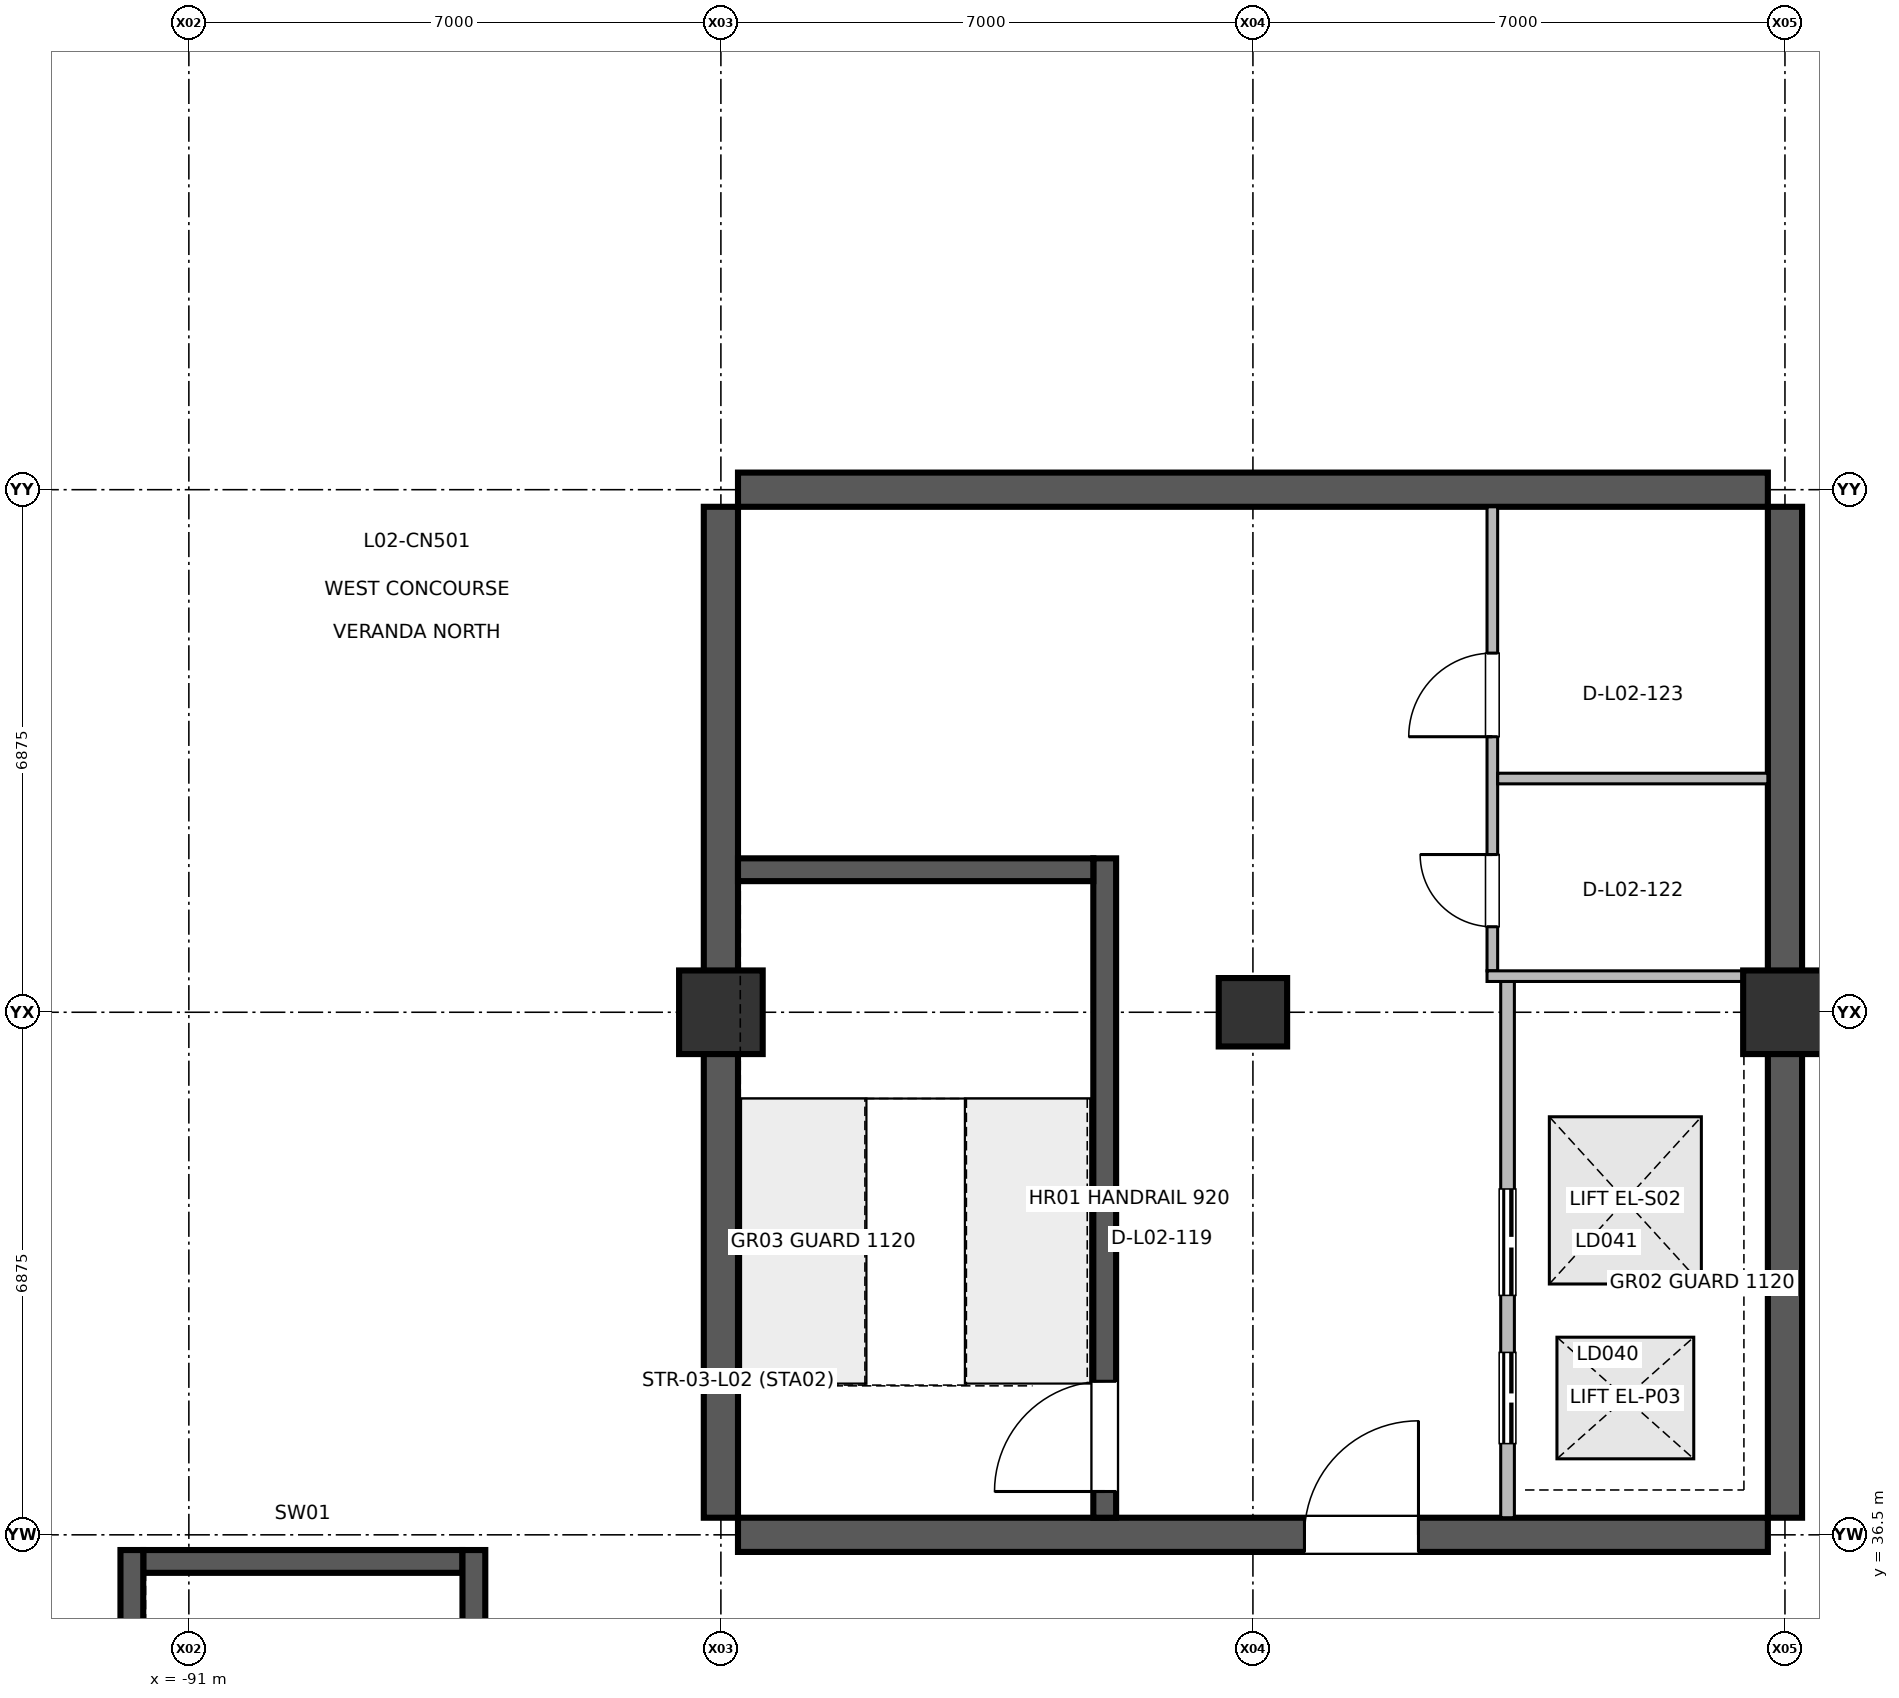
"""IFC4 building model, lengths in metres.
Left out: names, types, materials, properties, quantities, classifications, styles, units other than length and angle.
Written with IfcOpenShell. Run it as: python <this file> out.ifc"""

import sys

from ifc_helpers import new_model, si_unit, direction, frame, frame_2d, origin, origin_2d, place, context, subcontext, project, spatial, rectangle, extrude, element, fill, save


model = new_model("IFC4")
c1 = context("Model", 3, precision=1e-05, world=origin(), true_north=direction((0.0, 1.0)))
c2 = subcontext(c1, "Body", "Model", "MODEL_VIEW")
j1 = project(units=[si_unit("LENGTHUNIT", "METRE"), si_unit("PLANEANGLEUNIT", "RADIAN")], contexts=[c1])
p1 = place(None, origin())
s1 = spatial("IfcSite", under=j1, at=p1, CompositionType="ELEMENT")
p2 = place(p1, origin())
s2 = spatial("IfcBuilding", under=s1, at=p2, CompositionType="ELEMENT")
p3 = place(p2, frame((0.0, 0.0, 6.0)))
s3 = spatial("IfcBuildingStorey", under=s2, at=p3, CompositionType="ELEMENT", Elevation=6.0)
p4 = place(p3, frame((-84.0, 43.375, 0.0), z_axis=(0.0, 0.0, 1.0), x_axis=(1.0, 0.0, 0.0)))
e1 = element("IfcColumn", 1, at=p4, inside=s3, PredefinedType="COLUMN", context=c2, shape_type="SweptSolid", body=[
    extrude(rectangle(XDim=1.1, YDim=1.1, at=origin_2d()), origin(), (0.0, 0.0, 1.0), 5.398),
])
p5 = place(p3, frame((-77.0, 43.375, 0.0), z_axis=(0.0, 0.0, 1.0), x_axis=(1.0, 0.0, 0.0)))
e2 = element("IfcColumn", 2, at=p5, inside=s3, PredefinedType="COLUMN", context=c2, shape_type="SweptSolid", body=[
    extrude(rectangle(XDim=0.9, YDim=0.9, at=origin_2d()), origin(), (0.0, 0.0, 1.0), 5.398),
])
p6 = place(p3, frame((-70.0, 43.375, 0.0), z_axis=(0.0, 0.0, 1.0), x_axis=(1.0, 0.0, 0.0)))
e3 = element("IfcColumn", 3, at=p6, inside=s3, PredefinedType="COLUMN", context=c2, shape_type="SweptSolid", body=[
    extrude(rectangle(XDim=1.1, YDim=1.1, at=origin_2d()), origin(), (0.0, 0.0, 1.0), 5.398),
])
for number, where, z_axis, x_axis in (
    (4, (-84.0, 36.725, 0.0), (0.0, 0.0, 1.0), (0.0, 1.0, 0.0)),
    (5, (-70.0, 36.725, 0.0), (0.0, 0.0, 1.0), (0.0, 1.0, 0.0)),
):
    element("IfcWall", number, at=place(p3, frame(where, z_axis=z_axis, x_axis=x_axis)), inside=s3, PredefinedType="SHEAR", context=c2, shape_type="SweptSolid", body=[
        extrude(rectangle(XDim=13.3, YDim=0.45, at=frame_2d((6.65, 0.0))), origin(), (0.0, 0.0, 1.0), 5.2),
    ])
p7 = place(p3, frame((-83.775, 36.5, 0.0), z_axis=(0.0, 0.0, 1.0), x_axis=(1.0, 0.0, 0.0)))
e6 = element("IfcWall", 6, at=p7, inside=s3, PredefinedType="SHEAR", context=c2, shape_type="SweptSolid", body=[
    extrude(rectangle(XDim=13.55, YDim=0.45, at=frame_2d((6.775, 0.0))), origin(), (0.0, 0.0, 1.0), 5.2),
])
p8 = place(p7, frame((7.453, 0.0, 0.0)))
e7 = element("IfcOpeningElement", 7, at=p8, cuts=e6, PredefinedType="OPENING", context=c2, shape_type="SweptSolid", body=[
    extrude(rectangle(XDim=1.5, YDim=2.2, at=frame_2d((0.75, 1.1))), frame((0.0, 0.235, 0.0), z_axis=(0.0, -1.0, 0.0), x_axis=(1.0, 0.0, 0.0)), (0.0, 0.0, 1.0), 0.47),
])
p9 = place(p3, frame((-83.775, 50.25, 0.0), z_axis=(0.0, 0.0, 1.0), x_axis=(1.0, 0.0, 0.0)))
e8 = element("IfcWall", 8, at=p9, inside=s3, PredefinedType="SHEAR", context=c2, shape_type="SweptSolid", body=[
    extrude(rectangle(XDim=13.55, YDim=0.45, at=frame_2d((6.775, 0.0))), origin(), (0.0, 0.0, 1.0), 5.2),
])
p10 = place(p3, frame((-78.95, 36.725, 0.0), z_axis=(0.0, 0.0, 1.0), x_axis=(0.0, 1.0, 0.0)))
e9 = element("IfcWall", 9, at=p10, inside=s3, PredefinedType="SHEAR", context=c2, shape_type="SweptSolid", body=[
    extrude(rectangle(XDim=8.675, YDim=0.3, at=frame_2d((4.337, 0.0))), origin(), (0.0, 0.0, 1.0), 5.2),
])
p11 = place(p10, frame((0.345, 0.0, 0.0)))
e10 = element("IfcOpeningElement", 10, at=p11, cuts=e9, PredefinedType="OPENING", context=c2, shape_type="SweptSolid", body=[
    extrude(rectangle(XDim=1.45, YDim=2.2, at=frame_2d((0.725, 1.1))), frame((0.0, 0.16, 0.0), z_axis=(0.0, -1.0, 0.0), x_axis=(1.0, 0.0, 0.0)), (0.0, 0.0, 1.0), 0.32),
])
p12 = place(p3, frame((-73.65, 36.725, 0.0), z_axis=(0.0, 0.0, 1.0), x_axis=(0.0, 1.0, 0.0)))
e11 = element("IfcWall", 11, at=p12, inside=s3, PredefinedType="PARTITIONING", context=c2, shape_type="SweptSolid", body=[
    extrude(rectangle(XDim=7.055, YDim=0.18, at=frame_2d((3.527, 0.0))), origin(), (0.0, 0.0, 1.0), 3.575),
])
p13 = place(p12, frame((0.975, 0.0, 0.0)))
e12 = element("IfcOpeningElement", 12, at=p13, cuts=e11, PredefinedType="OPENING", context=c2, shape_type="SweptSolid", body=[
    extrude(rectangle(XDim=1.2, YDim=2.25, at=frame_2d((0.6, 1.125))), frame((0.0, 0.1, 0.0), z_axis=(0.0, -1.0, 0.0), x_axis=(1.0, 0.0, 0.0)), (0.0, 0.0, 1.0), 0.2),
])
p14 = place(p12, frame((2.925, 0.0, 0.0)))
e13 = element("IfcOpeningElement", 13, at=p14, cuts=e11, PredefinedType="OPENING", context=c2, shape_type="SweptSolid", body=[
    extrude(rectangle(XDim=1.4, YDim=2.3, at=frame_2d((0.7, 1.15))), frame((0.0, 0.1, 0.0), z_axis=(0.0, -1.0, 0.0), x_axis=(1.0, 0.0, 0.0)), (0.0, 0.0, 1.0), 0.2),
])
p15 = place(p3, frame((-73.85, 43.92, 0.0), z_axis=(0.0, 0.0, 1.0), x_axis=(0.0, 1.0, 0.0)))
e14 = element("IfcWall", 14, at=p15, inside=s3, PredefinedType="PARTITIONING", context=c2, shape_type="SweptSolid", body=[
    extrude(rectangle(XDim=6.105, YDim=0.14, at=frame_2d((3.052, 0.0))), origin(), (0.0, 0.0, 1.0), 3.575),
])
p16 = place(p15, frame((0.58, 0.0, 0.0)))
e15 = element("IfcOpeningElement", 15, at=p16, cuts=e14, PredefinedType="OPENING", context=c2, shape_type="SweptSolid", body=[
    extrude(rectangle(XDim=0.95, YDim=2.15, at=frame_2d((0.475, 1.075))), frame((0.0, 0.08, 0.0), z_axis=(0.0, -1.0, 0.0), x_axis=(1.0, 0.0, 0.0)), (0.0, 0.0, 1.0), 0.16),
])
p17 = place(p15, frame((3.08, 0.0, 0.0)))
e16 = element("IfcOpeningElement", 16, at=p17, cuts=e14, PredefinedType="OPENING", context=c2, shape_type="SweptSolid", body=[
    extrude(rectangle(XDim=1.1, YDim=2.15, at=frame_2d((0.55, 1.075))), frame((0.0, 0.08, 0.0), z_axis=(0.0, -1.0, 0.0), x_axis=(1.0, 0.0, 0.0)), (0.0, 0.0, 1.0), 0.16),
])
p18 = place(p3, frame((-73.92, 43.85, 0.0), z_axis=(0.0, 0.0, 1.0), x_axis=(1.0, 0.0, 0.0)))
e17 = element("IfcWall", 17, at=p18, inside=s3, PredefinedType="PARTITIONING", context=c2, shape_type="SweptSolid", body=[
    extrude(rectangle(XDim=3.695, YDim=0.14, at=frame_2d((1.847, 0.0))), origin(), (0.0, 0.0, 1.0), 3.575),
])
p19 = place(p3, frame((-73.78, 46.45, 0.0), z_axis=(0.0, 0.0, 1.0), x_axis=(1.0, 0.0, 0.0)))
e18 = element("IfcWall", 18, at=p19, inside=s3, PredefinedType="PARTITIONING", context=c2, shape_type="SweptSolid", body=[
    extrude(rectangle(XDim=3.555, YDim=0.14, at=frame_2d((1.777, 0.0))), origin(), (0.0, 0.0, 1.0), 4.42),
])
p20 = place(p3, frame((-83.775, 45.25, 0.0), z_axis=(0.0, 0.0, 1.0), x_axis=(1.0, 0.0, 0.0)))
e19 = element("IfcWall", 19, at=p20, inside=s3, PredefinedType="SHEAR", context=c2, shape_type="SweptSolid", body=[
    extrude(rectangle(XDim=4.675, YDim=0.3, at=frame_2d((2.337, 0.0))), origin(), (0.0, 0.0, 1.0), 5.2),
])
p21 = place(p3, frame((-91.6, 36.15, 0.0), z_axis=(0.0, 0.0, 1.0), x_axis=(1.0, 0.0, 0.0)))
e20 = element("IfcWall", 20, at=p21, inside=s3, PredefinedType="SHEAR", context=c2, shape_type="SweptSolid", body=[
    extrude(rectangle(XDim=4.2, YDim=0.3, at=frame_2d((2.1, 0.0))), origin(), (0.0, 0.0, 1.0), 5.2),
])
for number, where, z_axis, x_axis in (
    (21, (-91.75, 27.85, 0.0), (0.0, 0.0, 1.0), (0.0, 1.0, 0.0)),
    (22, (-87.25, 27.85, 0.0), (0.0, 0.0, 1.0), (0.0, 1.0, 0.0)),
):
    element("IfcWall", number, at=place(p3, frame(where, z_axis=z_axis, x_axis=x_axis)), inside=s3, PredefinedType="SHEAR", context=c2, shape_type="SweptSolid", body=[
        extrude(rectangle(XDim=8.45, YDim=0.3, at=frame_2d((4.225, 0.0))), origin(), (0.0, 0.0, 1.0), 5.2),
    ])
p22 = place(p8, origin())
e23 = element("IfcDoor", 23, at=p22, inside=s3, OperationType="SINGLE_SWING_RIGHT", PredefinedType="DOOR", context=c2, shape_type="SweptSolid", body=[
    extrude(rectangle(XDim=1.5, YDim=2.2, at=frame_2d((0.75, 1.1))), frame((0.0, 0.025, 0.0), z_axis=(0.0, -1.0, 0.0), x_axis=(1.0, 0.0, 0.0)), (0.0, 0.0, 1.0), 0.05),
])
fill(e7, e23)
p23 = place(p11, origin())
e24 = element("IfcDoor", 24, at=p23, inside=s3, OperationType="SINGLE_SWING_LEFT", PredefinedType="DOOR", context=c2, shape_type="SweptSolid", body=[
    extrude(rectangle(XDim=1.45, YDim=2.2, at=frame_2d((0.725, 1.1))), frame((0.0, 0.025, 0.0), z_axis=(0.0, -1.0, 0.0), x_axis=(1.0, 0.0, 0.0)), (0.0, 0.0, 1.0), 0.05),
])
fill(e10, e24)
p24 = place(p13, origin())
e25 = element("IfcDoor", 25, at=p24, inside=s3, OperationType="DOUBLE_DOOR_SLIDING", PredefinedType="DOOR", context=c2, shape_type="SweptSolid", body=[
    extrude(rectangle(XDim=1.2, YDim=2.25, at=frame_2d((0.6, 1.125))), frame((0.0, 0.025, 0.0), z_axis=(0.0, -1.0, 0.0), x_axis=(1.0, 0.0, 0.0)), (0.0, 0.0, 1.0), 0.05),
])
fill(e12, e25)
p25 = place(p14, origin())
e26 = element("IfcDoor", 26, at=p25, inside=s3, OperationType="DOUBLE_DOOR_SLIDING", PredefinedType="DOOR", context=c2, shape_type="SweptSolid", body=[
    extrude(rectangle(XDim=1.4, YDim=2.3, at=frame_2d((0.7, 1.15))), frame((0.0, 0.025, 0.0), z_axis=(0.0, -1.0, 0.0), x_axis=(1.0, 0.0, 0.0)), (0.0, 0.0, 1.0), 0.05),
])
fill(e13, e26)
p26 = place(p16, origin())
e27 = element("IfcDoor", 27, at=p26, inside=s3, OperationType="SINGLE_SWING_RIGHT", PredefinedType="DOOR", context=c2, shape_type="SweptSolid", body=[
    extrude(rectangle(XDim=0.95, YDim=2.15, at=frame_2d((0.475, 1.075))), frame((0.0, 0.025, 0.0), z_axis=(0.0, -1.0, 0.0), x_axis=(1.0, 0.0, 0.0)), (0.0, 0.0, 1.0), 0.05),
])
fill(e15, e27)
p27 = place(p17, origin())
e28 = element("IfcDoor", 28, at=p27, inside=s3, OperationType="SINGLE_SWING_LEFT", PredefinedType="DOOR", context=c2, shape_type="SweptSolid", body=[
    extrude(rectangle(XDim=1.1, YDim=2.15, at=frame_2d((0.55, 1.075))), frame((0.0, 0.025, 0.0), z_axis=(0.0, -1.0, 0.0), x_axis=(1.0, 0.0, 0.0)), (0.0, 0.0, 1.0), 0.05),
])
fill(e16, e28)
save(model, sys.argv[1])
